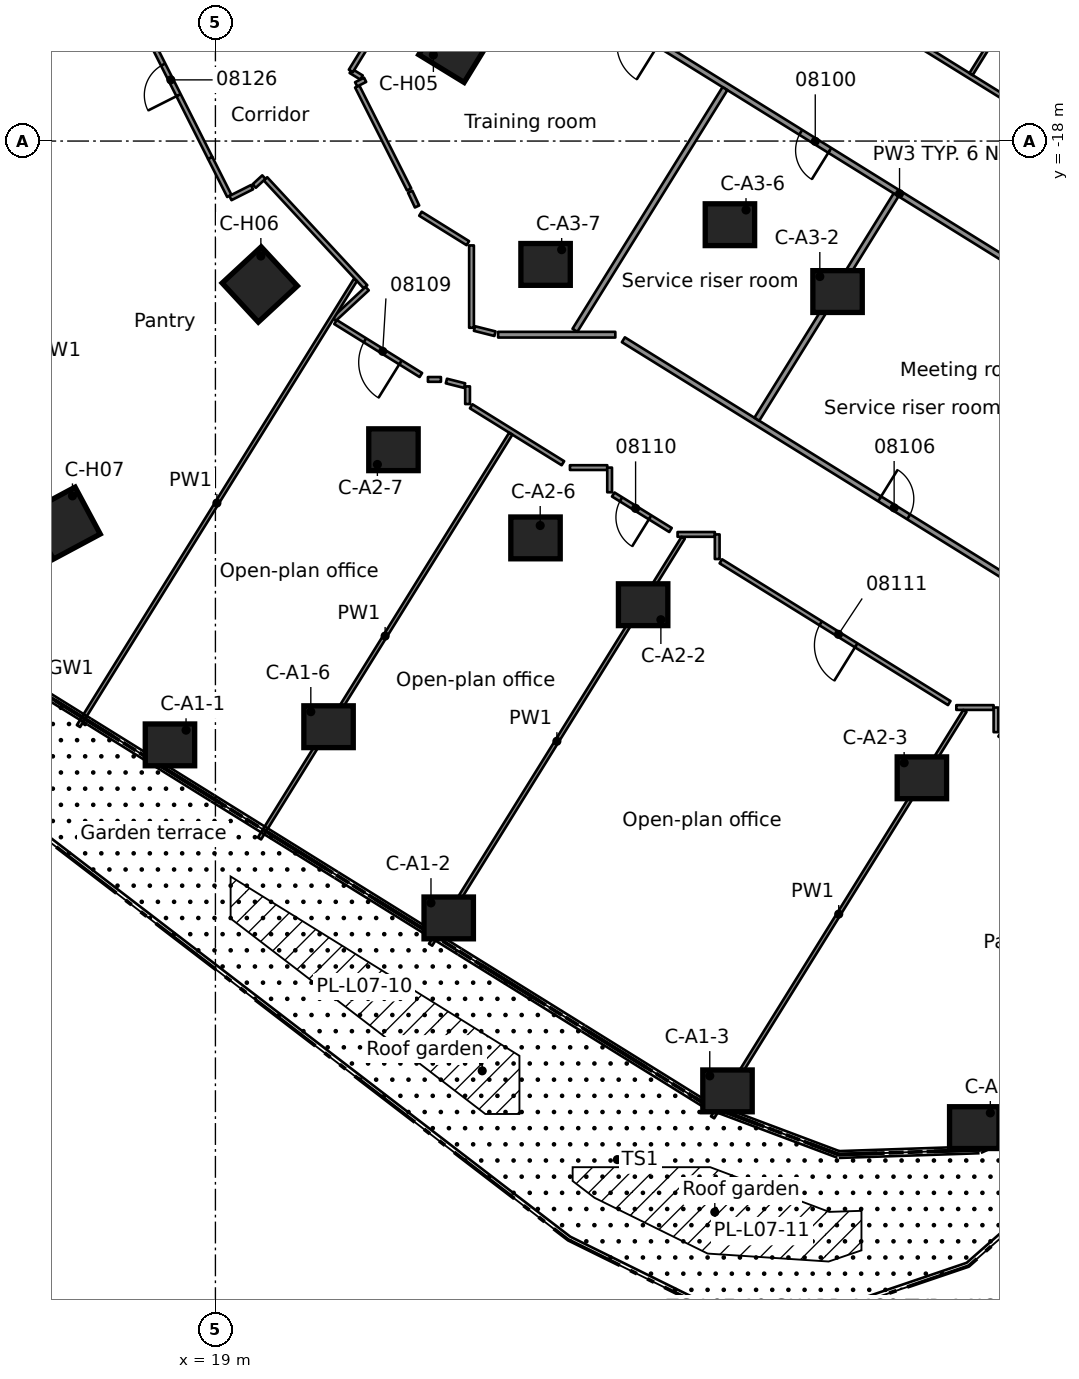
"""IFC4 building model, lengths in metres.
Left out: names, types, materials, properties, quantities, classifications, styles, units other than length and angle.
Written with IfcOpenShell. Run it as: python <this file> out.ifc"""

import sys

from ifc_helpers import new_model, si_unit, direction, frame, frame_2d, origin, origin_2d, place, context, subcontext, project, spatial, rectangle, extrude, element, fill, save


model = new_model("IFC4")
c1 = context("Model", 3, precision=1e-05, world=origin(), true_north=direction((0.0, 1.0)))
c2 = subcontext(c1, "Body", "Model", "MODEL_VIEW")
j1 = project(units=[si_unit("LENGTHUNIT", "METRE"), si_unit("PLANEANGLEUNIT", "RADIAN")], contexts=[c1])
p1 = place(None, origin())
s1 = spatial("IfcSite", under=j1, at=p1, CompositionType="ELEMENT")
p2 = place(p1, origin())
s2 = spatial("IfcBuilding", under=s1, at=p2, CompositionType="ELEMENT")
p3 = place(p2, frame((0.0, 0.0, 37.3)))
s3 = spatial("IfcBuildingStorey", under=s2, at=p3, CompositionType="ELEMENT", Elevation=37.3)
for number, where, z_axis, x_axis in (
    (1, (17.804, -33.888, 0.0), (0.0, 0.0, 1.0), (1.0, 0.0, 0.0)),
    (2, (25.139, -38.441, 0.0), (0.0, 0.0, 1.0), (1.0, 0.0, 0.0)),
    (3, (32.475, -42.992, 0.0), (0.0, 0.0, 1.0), (1.0, 0.0, 0.0)),
    (4, (38.968, -43.959, 0.0), (0.0, 0.0, 1.0), (1.0, 0.0, 0.0)),
    (5, (21.977, -33.41, 0.0), (0.0, 0.0, 1.0), (1.0, 0.0, 0.0)),
    (6, (30.255, -30.2, 0.0), (0.0, 0.0, 1.0), (1.0, 0.0, 0.0)),
    (7, (37.59, -34.754, 0.0), (0.0, 0.0, 1.0), (1.0, 0.0, 0.0)),
    (8, (27.423, -28.442, 0.0), (0.0, 0.0, 1.0), (1.0, 0.0, 0.0)),
    (9, (23.685, -26.122, 0.0), (0.0, 0.0, 1.0), (1.0, 0.0, 0.0)),
    (10, (35.371, -21.96, 0.0), (0.0, 0.0, 1.0), (1.0, 0.0, 0.0)),
    (11, (32.539, -20.201, 0.0), (0.0, 0.0, 1.0), (1.0, 0.0, 0.0)),
    (12, (27.688, -21.246, 0.0), (0.0, 0.0, 1.0), (1.0, 0.0, 0.0)),
):
    element("IfcColumn", number, at=place(p3, frame(where, z_axis=z_axis, x_axis=x_axis)), inside=s3, PredefinedType="COLUMN", context=c2, shape_type="SweptSolid", body=[
        extrude(rectangle(XDim=1.3, YDim=1.1, at=origin_2d()), origin(), (0.0, 0.0, 1.0), 3.5),
    ])
for number, where, z_axis, x_axis in (
    (13, (25.313, -15.495, 0.0), (0.0, 0.0, 1.0), (0.853, -0.522, 0.0)),
    (14, (20.167, -21.774, 0.0), (0.0, 0.0, 1.0), (0.68, -0.734, 0.0)),
    (15, (15.021, -28.054, 0.0), (0.0, 0.0, 1.0), (0.472, -0.882, 0.0)),
):
    element("IfcColumn", number, at=place(p3, frame(where, z_axis=z_axis, x_axis=x_axis)), inside=s3, PredefinedType="COLUMN", context=c2, shape_type="SweptSolid", body=[
        extrude(rectangle(XDim=1.4, YDim=1.4, at=origin_2d()), origin(), (0.0, 0.0, 1.0), 3.5),
    ])
p4 = place(p3, frame((24.125, -19.333, 0.0), z_axis=(0.0, 0.0, 1.0), x_axis=(0.421763397018, -0.906705926382, 0.0)))
e16 = element("IfcWall", 16, at=p4, inside=s3, PredefinedType="PARTITIONING", context=c2, shape_type="SweptSolid", body=[
    extrude(rectangle(XDim=0.429, YDim=0.125, at=frame_2d((0.214, 0.0))), origin(), (0.0, 0.0, 1.0), 3.06),
])
p5 = place(p3, frame((18.862, -18.444, 0.0), z_axis=(0.0, 0.0, 1.0), x_axis=(0.450002129545, -0.893027481887, 0.0)))
e17 = element("IfcWall", 17, at=p5, inside=s3, PredefinedType="PARTITIONING", context=c2, shape_type="SweptSolid", body=[
    extrude(rectangle(XDim=1.12, YDim=0.125, at=frame_2d((0.56, 0.0))), origin(), (0.0, 0.0, 1.0), 3.06),
])
p6 = place(p3, frame((18.862, -18.444, 0.0), z_axis=(0.0, 0.0, 1.0), x_axis=(-0.450138749971, 0.892958624895, 0.0)))
e18 = element("IfcWall", 18, at=p6, inside=s3, PredefinedType="PARTITIONING", context=c2, shape_type="SweptSolid", body=[
    extrude(rectangle(XDim=4.37, YDim=0.125, at=frame_2d((2.185, 0.0))), origin(), (0.0, 0.0, 1.0), 3.06),
])
p7 = place(p6, frame((1.85, 0.0, 0.0)))
e19 = element("IfcOpeningElement", 19, at=p7, cuts=e18, PredefinedType="OPENING", context=c2, shape_type="SweptSolid", body=[
    extrude(rectangle(XDim=0.9, YDim=2.1, at=frame_2d((0.45, 1.05))), frame((0.0, 0.073, 0.0), z_axis=(0.0, -1.0, 0.0), x_axis=(1.0, 0.0, 0.0)), (0.0, 0.0, 1.0), 0.145),
])
p8 = place(p3, frame((22.731, -16.564, 0.0), z_axis=(0.0, 0.0, 1.0), x_axis=(0.450236756355, -0.892909213317, 0.0)))
e20 = element("IfcWall", 20, at=p8, inside=s3, PredefinedType="PARTITIONING", context=c2, shape_type="SweptSolid", body=[
    extrude(rectangle(XDim=3.034, YDim=0.125, at=frame_2d((1.517, 0.0))), origin(), (0.0, 0.0, 1.0), 3.06),
])
p9 = place(p3, frame((20.317, -18.994, 0.0), z_axis=(0.0, 0.0, 1.0), x_axis=(0.679757225535, -0.733437191812, 0.0)))
e21 = element("IfcWall", 21, at=p9, inside=s3, PredefinedType="PARTITIONING", context=c2, shape_type="SweptSolid", body=[
    extrude(rectangle(XDim=3.875, YDim=0.125, at=frame_2d((1.938, 0.0))), origin(), (0.0, 0.0, 1.0), 3.06),
])
p10 = place(p3, frame((24.395, -19.912, 0.0), z_axis=(0.0, 0.0, 1.0), x_axis=(0.849378003629, -0.527785000689, 0.0)))
e22 = element("IfcWall", 22, at=p10, inside=s3, PredefinedType="PARTITIONING", context=c2, shape_type="SweptSolid", body=[
    extrude(rectangle(XDim=1.468, YDim=0.125, at=frame_2d((0.734, 0.0))), origin(), (0.0, 0.0, 1.0), 3.06),
])
p11 = place(p3, frame((30.975, -28.234, 0.0), z_axis=(0.0, 0.0, 1.0), x_axis=(-0.850042036272, 0.52671485319, 0.0)))
e23 = element("IfcWall", 23, at=p11, inside=s3, PredefinedType="PARTITIONING", context=c2, shape_type="SweptSolid", body=[
    extrude(rectangle(XDim=1.773, YDim=0.125, at=frame_2d((0.886, 0.0))), origin(), (0.0, 0.0, 1.0), 3.06),
])
p12 = place(p11, frame((0.631, 0.0, 0.0)))
e24 = element("IfcOpeningElement", 24, at=p12, cuts=e23, PredefinedType="OPENING", context=c2, shape_type="SweptSolid", body=[
    extrude(rectangle(XDim=0.9, YDim=2.1, at=frame_2d((0.45, 1.05))), frame((0.0, 0.073, 0.0), z_axis=(0.0, -1.0, 0.0), x_axis=(1.0, 0.0, 0.0)), (0.0, 0.0, 1.0), 0.145),
])
p13 = place(p3, frame((24.406, -24.156, 0.0), z_axis=(0.0, 0.0, 1.0), x_axis=(-0.849654435135, 0.527339872241, 0.0)))
e25 = element("IfcWall", 25, at=p13, inside=s3, PredefinedType="PARTITIONING", context=c2, shape_type="SweptSolid", body=[
    extrude(rectangle(XDim=2.644, YDim=0.125, at=frame_2d((1.322, 0.0))), origin(), (0.0, 0.0, 1.0), 3.06),
])
p14 = place(p13, frame((0.631, 0.0, 0.0)))
e26 = element("IfcOpeningElement", 26, at=p14, cuts=e25, PredefinedType="OPENING", context=c2, shape_type="SweptSolid", body=[
    extrude(rectangle(XDim=1.1, YDim=2.1, at=frame_2d((0.55, 1.05))), frame((0.0, 0.073, 0.0), z_axis=(0.0, -1.0, 0.0), x_axis=(1.0, 0.0, 0.0)), (0.0, 0.0, 1.0), 0.145),
])
p15 = place(p3, frame((25.73, -24.979, 0.0), z_axis=(0.0, 0.0, 1.0), x_axis=(0.849693269932, -0.527277296147, 0.0)))
e27 = element("IfcWall", 27, at=p15, inside=s3, PredefinedType="PARTITIONING", context=c2, shape_type="SweptSolid", body=[
    extrude(rectangle(XDim=2.841, YDim=0.125, at=frame_2d((1.42, 0.0))), origin(), (0.0, 0.0, 1.0), 3.06),
])
p16 = place(p3, frame((38.31, -32.788, 0.0), z_axis=(0.0, 0.0, 1.0), x_axis=(-0.849663629849, 0.527325057352, 0.0)))
e28 = element("IfcWall", 28, at=p16, inside=s3, PredefinedType="PARTITIONING", context=c2, shape_type="SweptSolid", body=[
    extrude(rectangle(XDim=7.073, YDim=0.125, at=frame_2d((3.537, 0.0))), origin(), (0.0, 0.0, 1.0), 3.06),
])
p17 = place(p16, frame((2.881, 0.0, 0.0)))
e29 = element("IfcOpeningElement", 29, at=p17, cuts=e28, PredefinedType="OPENING", context=c2, shape_type="SweptSolid", body=[
    extrude(rectangle(XDim=1.1, YDim=2.1, at=frame_2d((0.55, 1.05))), frame((0.0, 0.073, 0.0), z_axis=(0.0, -1.0, 0.0), x_axis=(1.0, 0.0, 0.0)), (0.0, 0.0, 1.0), 0.145),
])
p18 = place(p3, frame((39.635, -33.612, 0.0), z_axis=(0.0, 0.0, 1.0), x_axis=(0.849721068894, -0.527232496226, 0.0)))
e30 = element("IfcWall", 30, at=p18, inside=s3, PredefinedType="PARTITIONING", context=c2, shape_type="SweptSolid", body=[
    extrude(rectangle(XDim=4.336, YDim=0.125, at=frame_2d((2.168, 0.0))), origin(), (0.0, 0.0, 1.0), 3.06),
])
p19 = place(p3, frame((29.735, -23.228, 0.0), z_axis=(0.0, 0.0, 1.0), x_axis=(0.849593173651, -0.527438564466, 0.0)))
e31 = element("IfcWall", 31, at=p19, inside=s3, PredefinedType="PARTITIONING", context=c2, shape_type="SweptSolid", body=[
    extrude(rectangle(XDim=14.61, YDim=0.15, at=frame_2d((7.305, 0.0))), origin(), (0.0, 0.0, 1.0), 3.06),
])
p20 = place(p19, frame((7.936, 0.0, 0.0)))
e32 = element("IfcOpeningElement", 32, at=p20, cuts=e31, PredefinedType="OPENING", context=c2, shape_type="SweptSolid", body=[
    extrude(rectangle(XDim=0.9, YDim=2.1, at=frame_2d((0.45, 1.05))), frame((0.0, 0.085, 0.0), z_axis=(0.0, -1.0, 0.0), x_axis=(1.0, 0.0, 0.0)), (0.0, 0.0, 1.0), 0.17),
])
p21 = place(p3, frame((45.891, -24.905, 0.0), z_axis=(0.0, 0.0, 1.0), x_axis=(-0.849504231943, 0.527581803999, 0.0)))
e33 = element("IfcWall", 33, at=p21, inside=s3, PredefinedType="PARTITIONING", context=c2, shape_type="SweptSolid", body=[
    extrude(rectangle(XDim=20.927, YDim=0.15, at=frame_2d((10.464, 0.0))), origin(), (0.0, 0.0, 1.0), 3.06),
])
p22 = place(p21, frame((12.625, 0.0, 0.0)))
e34 = element("IfcOpeningElement", 34, at=p22, cuts=e33, PredefinedType="OPENING", context=c2, shape_type="SweptSolid", body=[
    extrude(rectangle(XDim=0.9, YDim=2.1, at=frame_2d((0.45, 1.05))), frame((0.0, 0.085, 0.0), z_axis=(0.0, -1.0, 0.0), x_axis=(1.0, 0.0, 0.0)), (0.0, 0.0, 1.0), 0.17),
])
p23 = place(p21, frame((17.925, 0.0, 0.0)))
e35 = element("IfcOpeningElement", 35, at=p23, cuts=e33, PredefinedType="OPENING", context=c2, shape_type="SweptSolid", body=[
    extrude(rectangle(XDim=1.1, YDim=2.1, at=frame_2d((0.55, 1.05))), frame((0.0, 0.085, 0.0), z_axis=(0.0, -1.0, 0.0), x_axis=(1.0, 0.0, 0.0)), (0.0, 0.0, 1.0), 0.17),
])
p24 = place(p3, frame((31.21, -11.548, 0.0), z_axis=(0.0, 0.0, 1.0), x_axis=(0.849604026752, -0.527421081989, 0.0)))
e36 = element("IfcWall", 36, at=p24, inside=s3, PredefinedType="PARTITIONING", context=c2, shape_type="SweptSolid", body=[
    extrude(rectangle(XDim=17.536, YDim=0.125, at=frame_2d((8.768, 0.0))), origin(), (0.0, 0.0, 1.0), 3.06),
])
p25 = place(p24, frame((1.288, 0.0, 0.0)))
e37 = element("IfcOpeningElement", 37, at=p25, cuts=e36, PredefinedType="OPENING", context=c2, shape_type="SweptSolid", body=[
    extrude(rectangle(XDim=1.1, YDim=2.1, at=frame_2d((0.55, 1.05))), frame((0.0, 0.073, 0.0), z_axis=(0.0, -1.0, 0.0), x_axis=(1.0, 0.0, 0.0)), (0.0, 0.0, 1.0), 0.145),
])
p26 = place(p24, frame((4.043, 0.0, 0.0)))
e38 = element("IfcOpeningElement", 38, at=p26, cuts=e36, PredefinedType="OPENING", context=c2, shape_type="SweptSolid", body=[
    extrude(rectangle(XDim=1.1, YDim=2.1, at=frame_2d((0.55, 1.05))), frame((0.0, 0.073, 0.0), z_axis=(0.0, -1.0, 0.0), x_axis=(1.0, 0.0, 0.0)), (0.0, 0.0, 1.0), 0.145),
])
p27 = place(p24, frame((12.844, 0.0, 0.0)))
e39 = element("IfcOpeningElement", 39, at=p27, cuts=e36, PredefinedType="OPENING", context=c2, shape_type="SweptSolid", body=[
    extrude(rectangle(XDim=1.1, YDim=2.1, at=frame_2d((0.55, 1.05))), frame((0.0, 0.073, 0.0), z_axis=(0.0, -1.0, 0.0), x_axis=(1.0, 0.0, 0.0)), (0.0, 0.0, 1.0), 0.145),
])
p28 = place(p3, frame((22.564, -16.156, 0.0), z_axis=(0.0, 0.0, 1.0), x_axis=(0.853080239827, -0.521779747036, 0.0)))
e40 = element("IfcWall", 40, at=p28, inside=s3, PredefinedType="PARTITIONING", context=c2, shape_type="SweptSolid", body=[
    extrude(rectangle(XDim=0.329, YDim=0.125, at=frame_2d((0.165, 0.0))), origin(), (0.0, 0.0, 1.0), 3.06),
])
p29 = place(p3, frame((25.078, -24.314, 0.0), z_axis=(0.0, 0.0, 1.0), x_axis=(0.96949965475, -0.245092675207, 0.0)))
e41 = element("IfcWall", 41, at=p29, inside=s3, PredefinedType="PARTITIONING", context=c2, shape_type="SweptSolid", body=[
    extrude(rectangle(XDim=0.494, YDim=0.125, at=frame_2d((0.247, 0.0))), origin(), (0.0, 0.0, 1.0), 3.06),
])
p30 = place(p3, frame((25.817, -22.933, 0.0), z_axis=(0.0, 0.0, 1.0), x_axis=(0.96962366247, -0.244601621375, 0.0)))
e42 = element("IfcWall", 42, at=p30, inside=s3, PredefinedType="PARTITIONING", context=c2, shape_type="SweptSolid", body=[
    extrude(rectangle(XDim=0.556, YDim=0.125, at=frame_2d((0.278, 0.0))), origin(), (0.0, 0.0, 1.0), 3.06),
])
p31 = place(p3, frame((38.496, -32.905, 0.0), z_axis=(0.0, 0.0, 1.0), x_axis=(1.0, 0.0, 0.0)))
e43 = element("IfcWall", 43, at=p31, inside=s3, PredefinedType="PARTITIONING", context=c2, shape_type="SweptSolid", body=[
    extrude(rectangle(XDim=0.981, YDim=0.125, at=frame_2d((0.49, 0.0))), origin(), (0.0, 0.0, 1.0), 3.06),
])
p32 = place(p3, frame((31.161, -28.35, 0.0), z_axis=(0.0, 0.0, 1.0), x_axis=(1.0, 0.0, 0.0)))
e44 = element("IfcWall", 44, at=p32, inside=s3, PredefinedType="PARTITIONING", context=c2, shape_type="SweptSolid", body=[
    extrude(rectangle(XDim=0.981, YDim=0.125, at=frame_2d((0.491, 0.0))), origin(), (0.0, 0.0, 1.0), 3.06),
])
p33 = place(p3, frame((28.329, -26.592, 0.0), z_axis=(0.0, 0.0, 1.0), x_axis=(1.0, 0.0, 0.0)))
e45 = element("IfcWall", 45, at=p33, inside=s3, PredefinedType="PARTITIONING", context=c2, shape_type="SweptSolid", body=[
    extrude(rectangle(XDim=0.982, YDim=0.125, at=frame_2d((0.491, 0.0))), origin(), (0.0, 0.0, 1.0), 3.06),
])
p34 = place(p3, frame((24.592, -24.272, 0.0), z_axis=(0.0, 0.0, 1.0), x_axis=(1.0, 0.0, 0.0)))
e46 = element("IfcWall", 46, at=p34, inside=s3, PredefinedType="PARTITIONING", context=c2, shape_type="SweptSolid", body=[
    extrude(rectangle(XDim=0.342, YDim=0.125, at=frame_2d((0.171, 0.0))), origin(), (0.0, 0.0, 1.0), 3.06),
])
p35 = place(p3, frame((26.439, -23.095, 0.0), z_axis=(0.0, 0.0, 1.0), x_axis=(1.0, 0.0, 0.0)))
e47 = element("IfcWall", 47, at=p35, inside=s3, PredefinedType="PARTITIONING", context=c2, shape_type="SweptSolid", body=[
    extrude(rectangle(XDim=3.084, YDim=0.15, at=frame_2d((1.542, 0.0))), origin(), (0.0, 0.0, 1.0), 3.06),
])
p36 = place(p3, frame((19.395, -19.5, 0.0), z_axis=(0.0, 0.0, 1.0), x_axis=(0.892812732839, 0.450428045396, 0.0)))
e48 = element("IfcWall", 48, at=p36, inside=s3, PredefinedType="PARTITIONING", context=c2, shape_type="SweptSolid", body=[
    extrude(rectangle(XDim=0.637, YDim=0.125, at=frame_2d((0.319, 0.0))), origin(), (0.0, 0.0, 1.0), 3.06),
])
p37 = place(p3, frame((22.703, -16.508, 0.0), z_axis=(0.0, 0.0, 1.0), x_axis=(0.891271495478, 0.453470088703, 0.0)))
e49 = element("IfcWall", 49, at=p37, inside=s3, PredefinedType="PARTITIONING", context=c2, shape_type="SweptSolid", body=[
    extrude(rectangle(XDim=0.265, YDim=0.125, at=frame_2d((0.132, 0.0))), origin(), (0.0, 0.0, 1.0), 3.06),
])
p38 = place(p3, frame((22.127, -22.684, 0.0), z_axis=(0.0, 0.0, 1.0), x_axis=(0.733684285914, 0.679490521349, 0.0)))
e50 = element("IfcWall", 50, at=p38, inside=s3, PredefinedType="PARTITIONING", context=c2, shape_type="SweptSolid", body=[
    extrude(rectangle(XDim=1.18, YDim=0.125, at=frame_2d((0.59, 0.0))), origin(), (0.0, 0.0, 1.0), 3.06),
])
p39 = place(p3, frame((20.02, -19.184, 0.0), z_axis=(0.0, 0.0, 1.0), x_axis=(0.733643888507, 0.67953413811, 0.0)))
e51 = element("IfcWall", 51, at=p39, inside=s3, PredefinedType="PARTITIONING", context=c2, shape_type="SweptSolid", body=[
    extrude(rectangle(XDim=0.347, YDim=0.125, at=frame_2d((0.174, 0.0))), origin(), (0.0, 0.0, 1.0), 3.06),
])
p40 = place(p3, frame((32.082, -43.688, 0.0), z_axis=(0.0, 0.0, 1.0), x_axis=(0.527487900205, 0.849562543394, 0.0)))
e52 = element("IfcWall", 52, at=p40, inside=s3, PredefinedType="PARTITIONING", context=c2, shape_type="SweptSolid", body=[
    extrude(rectangle(XDim=12.588, YDim=0.1, at=frame_2d((6.294, 0.0))), origin(), (0.0, 0.0, 1.0), 3.06),
])
p41 = place(p3, frame((24.662, -39.146, 0.0), z_axis=(0.0, 0.0, 1.0), x_axis=(0.527433265795, 0.849596463112, 0.0)))
e53 = element("IfcWall", 53, at=p41, inside=s3, PredefinedType="PARTITIONING", context=c2, shape_type="SweptSolid", body=[
    extrude(rectangle(XDim=12.603, YDim=0.1, at=frame_2d((6.301, 0.0))), origin(), (0.0, 0.0, 1.0), 3.06),
])
p42 = place(p3, frame((33.247, -25.319, 0.0), z_axis=(0.0, 0.0, 1.0), x_axis=(0.527346241806, 0.849650481818, 0.0)))
e54 = element("IfcWall", 54, at=p42, inside=s3, PredefinedType="PARTITIONING", context=c2, shape_type="SweptSolid", body=[
    extrude(rectangle(XDim=6.948, YDim=0.15, at=frame_2d((3.474, 0.0))), origin(), (0.0, 0.0, 1.0), 3.06),
])
p43 = place(p3, frame((38.884, -16.239, 0.0), z_axis=(0.0, 0.0, 1.0), x_axis=(0.527383064754, 0.849627626087, 0.0)))
e55 = element("IfcWall", 55, at=p43, inside=s3, PredefinedType="PARTITIONING", context=c2, shape_type="SweptSolid", body=[
    extrude(rectangle(XDim=13.536, YDim=0.1, at=frame_2d((6.768, 0.0))), origin(), (0.0, 0.0, 1.0), 3.06),
])
p44 = place(p3, frame((20.159, -36.35, 0.0), z_axis=(0.0, 0.0, 1.0), x_axis=(0.527477742042, 0.849568850447, 0.0)))
e56 = element("IfcWall", 56, at=p44, inside=s3, PredefinedType="PARTITIONING", context=c2, shape_type="SweptSolid", body=[
    extrude(rectangle(XDim=12.537, YDim=0.1, at=frame_2d((6.269, 0.0))), origin(), (0.0, 0.0, 1.0), 3.06),
])
p45 = place(p3, frame((28.46, -22.98, 0.0), z_axis=(0.0, 0.0, 1.0), x_axis=(0.527410761015, 0.849610433767, 0.0)))
e57 = element("IfcWall", 57, at=p45, inside=s3, PredefinedType="PARTITIONING", context=c2, shape_type="SweptSolid", body=[
    extrude(rectangle(XDim=7.486, YDim=0.15, at=frame_2d((3.743, 0.0))), origin(), (0.0, 0.0, 1.0), 3.06),
])
p46 = place(p3, frame((15.396, -33.393, 0.0), z_axis=(0.0, 0.0, 1.0), x_axis=(0.527468891267, 0.849574345626, 0.0)))
e58 = element("IfcWall", 58, at=p46, inside=s3, PredefinedType="PARTITIONING", context=c2, shape_type="SweptSolid", body=[
    extrude(rectangle(XDim=13.813, YDim=0.1, at=frame_2d((6.906, 0.0))), origin(), (0.0, 0.0, 1.0), 3.06),
])
p47 = place(p3, frame((22.564, -16.155, 0.0), z_axis=(0.0, 0.0, 1.0), x_axis=(0.523800782585, 0.851840795081, 0.0)))
e59 = element("IfcWall", 59, at=p47, inside=s3, PredefinedType="PARTITIONING", context=c2, shape_type="SweptSolid", body=[
    extrude(rectangle(XDim=0.781, YDim=0.125, at=frame_2d((0.39, 0.0))), origin(), (0.0, 0.0, 1.0), 3.06),
])
for number, where, z_axis, x_axis in (
    (60, (39.54, -33.553, 0.0), (0.0, 0.0, 1.0), (0.0, 1.0, 0.0)),
    (61, (32.204, -28.998, 0.0), (0.0, 0.0, 1.0), (0.0, 1.0, 0.0)),
):
    element("IfcWall", number, at=place(p3, frame(where, z_axis=z_axis, x_axis=x_axis)), inside=s3, PredefinedType="PARTITIONING", context=c2, shape_type="SweptSolid", body=[
        extrude(rectangle(XDim=0.648, YDim=0.125, at=frame_2d((0.324, 0.0))), origin(), (0.0, 0.0, 1.0), 3.06),
    ])
p48 = place(p3, frame((29.373, -27.241, 0.0), z_axis=(0.0, 0.0, 1.0), x_axis=(0.0, 1.0, 0.0)))
e62 = element("IfcWall", 62, at=p48, inside=s3, PredefinedType="PARTITIONING", context=c2, shape_type="SweptSolid", body=[
    extrude(rectangle(XDim=0.649, YDim=0.125, at=frame_2d((0.324, 0.0))), origin(), (0.0, 0.0, 1.0), 3.06),
])
p49 = place(p3, frame((25.739, -22.913, 0.0), z_axis=(0.0, 0.0, 1.0), x_axis=(0.0, 1.0, 0.0)))
e63 = element("IfcWall", 63, at=p49, inside=s3, PredefinedType="PARTITIONING", context=c2, shape_type="SweptSolid", body=[
    extrude(rectangle(XDim=2.167, YDim=0.125, at=frame_2d((1.083, 0.0))), origin(), (0.0, 0.0, 1.0), 3.06),
])
p50 = place(p3, frame((25.635, -24.92, 0.0), z_axis=(0.0, 0.0, 1.0), x_axis=(0.0, 1.0, 0.0)))
e64 = element("IfcWall", 64, at=p50, inside=s3, PredefinedType="PARTITIONING", context=c2, shape_type="SweptSolid", body=[
    extrude(rectangle(XDim=0.465, YDim=0.125, at=frame_2d((0.232, 0.0))), origin(), (0.0, 0.0, 1.0), 3.06),
])
p51 = place(p22, origin())
e65 = element("IfcDoor", 65, at=p51, inside=s3, OperationType="SINGLE_SWING_RIGHT", PredefinedType="DOOR", context=c2, shape_type="SweptSolid", body=[
    extrude(rectangle(XDim=0.9, YDim=2.1, at=frame_2d((0.45, 1.05))), frame((0.0, 0.025, 0.0), z_axis=(0.0, -1.0, 0.0), x_axis=(1.0, 0.0, 0.0)), (0.0, 0.0, 1.0), 0.05),
])
fill(e34, e65)
p52 = place(p20, origin())
e66 = element("IfcDoor", 66, at=p52, inside=s3, OperationType="SINGLE_SWING_RIGHT", PredefinedType="DOOR", context=c2, shape_type="SweptSolid", body=[
    extrude(rectangle(XDim=0.9, YDim=2.1, at=frame_2d((0.45, 1.05))), frame((0.0, 0.025, 0.0), z_axis=(0.0, -1.0, 0.0), x_axis=(1.0, 0.0, 0.0)), (0.0, 0.0, 1.0), 0.05),
])
fill(e32, e66)
p53 = place(p14, origin())
e67 = element("IfcDoor", 67, at=p53, inside=s3, OperationType="SINGLE_SWING_LEFT", PredefinedType="DOOR", context=c2, shape_type="SweptSolid", body=[
    extrude(rectangle(XDim=1.1, YDim=2.1, at=frame_2d((0.55, 1.05))), frame((0.0, 0.025, 0.0), z_axis=(0.0, -1.0, 0.0), x_axis=(1.0, 0.0, 0.0)), (0.0, 0.0, 1.0), 0.05),
])
fill(e26, e67)
p54 = place(p12, origin())
e68 = element("IfcDoor", 68, at=p54, inside=s3, OperationType="SINGLE_SWING_RIGHT", PredefinedType="DOOR", context=c2, shape_type="SweptSolid", body=[
    extrude(rectangle(XDim=0.9, YDim=2.1, at=frame_2d((0.45, 1.05))), frame((0.0, 0.025, 0.0), z_axis=(0.0, -1.0, 0.0), x_axis=(1.0, 0.0, 0.0)), (0.0, 0.0, 1.0), 0.05),
])
fill(e24, e68)
p55 = place(p17, origin())
e69 = element("IfcDoor", 69, at=p55, inside=s3, OperationType="SINGLE_SWING_LEFT", PredefinedType="DOOR", context=c2, shape_type="SweptSolid", body=[
    extrude(rectangle(XDim=1.1, YDim=2.1, at=frame_2d((0.55, 1.05))), frame((0.0, 0.025, 0.0), z_axis=(0.0, -1.0, 0.0), x_axis=(1.0, 0.0, 0.0)), (0.0, 0.0, 1.0), 0.05),
])
fill(e29, e69)
p56 = place(p7, origin())
e70 = element("IfcDoor", 70, at=p56, inside=s3, OperationType="SINGLE_SWING_RIGHT", PredefinedType="DOOR", context=c2, shape_type="SweptSolid", body=[
    extrude(rectangle(XDim=0.9, YDim=2.1, at=frame_2d((0.45, 1.05))), frame((0.0, 0.025, 0.0), z_axis=(0.0, -1.0, 0.0), x_axis=(1.0, 0.0, 0.0)), (0.0, 0.0, 1.0), 0.05),
])
fill(e19, e70)
save(model, sys.argv[1])
